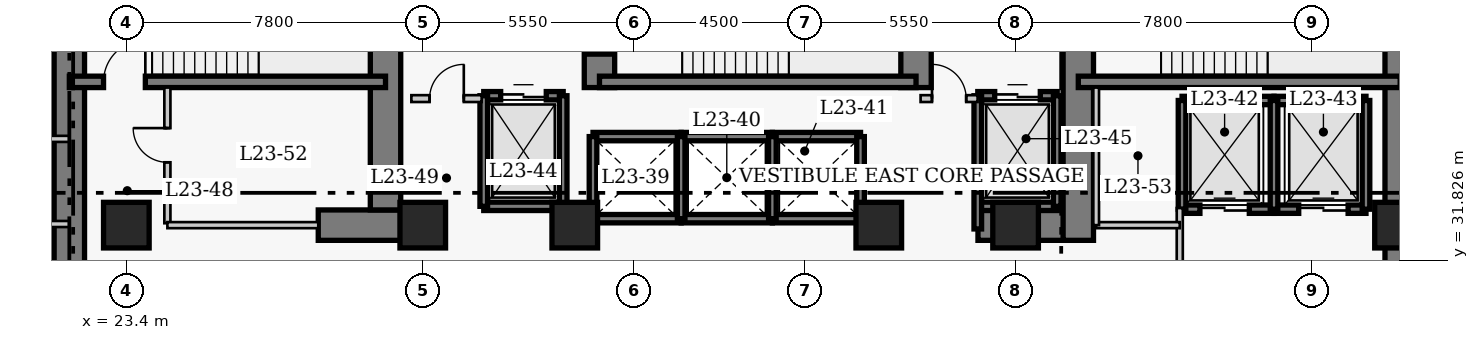
"""IFC4 building model, lengths in metres.
Left out: names, types, materials, properties, quantities, classifications, styles, units other than length and angle.
Written with IfcOpenShell. Run it as: python <this file> out.ifc"""

import sys

from ifc_helpers import new_model, si_unit, direction, frame, frame_2d, origin, origin_2d, place, context, subcontext, project, spatial, rectangle, extrude, element, fill, save


model = new_model("IFC4")
c1 = context("Model", 3, precision=1e-05, world=origin(), true_north=direction((0.0, 1.0)))
c2 = subcontext(c1, "Body", "Model", "MODEL_VIEW")
j1 = project(units=[si_unit("LENGTHUNIT", "METRE"), si_unit("PLANEANGLEUNIT", "RADIAN")], contexts=[c1])
p1 = place(None, origin())
s1 = spatial("IfcSite", under=j1, at=p1, CompositionType="ELEMENT")
p2 = place(p1, origin())
s2 = spatial("IfcBuilding", under=s1, at=p2, CompositionType="ELEMENT")
p3 = place(p2, frame((0.0, 0.0, 95.6)))
s3 = spatial("IfcBuildingStorey", under=s2, at=p3, CompositionType="ELEMENT", Elevation=95.6)
for number, where, z_axis, x_axis in (
    (1, (21.9, 27.05, 0.0), (0.0, 0.0, 1.0), (0.0, 1.0, 0.0)),
    (2, (56.92, 27.05, 0.0), (0.0, 0.0, 1.0), (0.0, 1.0, 0.0)),
):
    element("IfcWall", number, at=place(p3, frame(where, z_axis=z_axis, x_axis=x_axis)), inside=s3, PredefinedType="SHEAR", context=c2, shape_type="SweptSolid", body=[
        extrude(rectangle(XDim=13.67, YDim=0.8, at=frame_2d((6.835, 0.0))), origin(), (0.0, 0.0, 1.0), 3.8),
    ])
p4 = place(p3, frame((28.45, 32.75, 0.0), z_axis=(0.0, 0.0, 1.0), x_axis=(1.0, 0.0, 0.0)))
e3 = element("IfcWall", 3, at=p4, inside=s3, PredefinedType="SHEAR", context=c2, shape_type="SweptSolid", body=[
    extrude(rectangle(XDim=2.4, YDim=0.8, at=frame_2d((1.2, 0.0))), origin(), (0.0, 0.0, 1.0), 3.8),
])
p5 = place(p3, frame((45.81, 32.75, 0.0), z_axis=(0.0, 0.0, 1.0), x_axis=(1.0, 0.0, 0.0)))
e4 = element("IfcWall", 4, at=p5, inside=s3, PredefinedType="SHEAR", context=c2, shape_type="SweptSolid", body=[
    extrude(rectangle(XDim=2.64, YDim=0.8, at=frame_2d((1.32, 0.0))), origin(), (0.0, 0.0, 1.0), 3.8),
])
p6 = place(p3, frame((30.22, 33.15, 0.0), z_axis=(0.0, 0.0, 1.0), x_axis=(0.0, 1.0, 0.0)))
e5 = element("IfcWall", 5, at=p6, inside=s3, PredefinedType="SHEAR", context=c2, shape_type="SweptSolid", body=[
    extrude(rectangle(XDim=7.17, YDim=0.8, at=frame_2d((3.585, 0.0))), origin(), (0.0, 0.0, 1.0), 3.8),
])
p7 = place(p3, frame((35.85, 36.37, 0.0), z_axis=(0.0, 0.0, 1.0), x_axis=(0.0, 1.0, 0.0)))
e6 = element("IfcWall", 6, at=p7, inside=s3, PredefinedType="SHEAR", context=c2, shape_type="SweptSolid", body=[
    extrude(rectangle(XDim=3.95, YDim=0.8, at=frame_2d((1.975, 0.0))), origin(), (0.0, 0.0, 1.0), 3.8),
])
p8 = place(p7, frame((0.88, 0.0, 0.0)))
e7 = element("IfcOpeningElement", 7, at=p8, cuts=e6, PredefinedType="OPENING", context=c2, shape_type="SweptSolid", body=[
    extrude(rectangle(XDim=1.1, YDim=2.15, at=frame_2d((0.55, 1.075))), frame((0.0, 0.41, 0.0), z_axis=(0.0, -1.0, 0.0), x_axis=(1.0, 0.0, 0.0)), (0.0, 0.0, 1.0), 0.82),
])
p9 = place(p3, frame((44.18, 36.37, 0.0), z_axis=(0.0, 0.0, 1.0), x_axis=(0.0, 1.0, 0.0)))
e8 = element("IfcWall", 8, at=p9, inside=s3, PredefinedType="SHEAR", context=c2, shape_type="SweptSolid", body=[
    extrude(rectangle(XDim=3.95, YDim=0.8, at=frame_2d((1.975, 0.0))), origin(), (0.0, 0.0, 1.0), 3.8),
])
p10 = place(p3, frame((48.45, 32.35, 0.0), z_axis=(0.0, 0.0, 1.0), x_axis=(0.0, 1.0, 0.0)))
e9 = element("IfcWall", 9, at=p10, inside=s3, PredefinedType="SHEAR", context=c2, shape_type="SweptSolid", body=[
    extrude(rectangle(XDim=7.97, YDim=0.8, at=frame_2d((3.985, 0.0))), origin(), (0.0, 0.0, 1.0), 3.8),
])
p11 = place(p10, frame((5.85, 0.0, 0.0)))
e10 = element("IfcOpeningElement", 10, at=p11, cuts=e9, PredefinedType="OPENING", context=c2, shape_type="SweptSolid", body=[
    extrude(rectangle(XDim=1.1, YDim=2.15, at=frame_2d((0.55, 1.075))), frame((0.0, 0.41, 0.0), z_axis=(0.0, -1.0, 0.0), x_axis=(1.0, 0.0, 0.0)), (0.0, 0.0, 1.0), 0.82),
])
p12 = place(p3, frame((21.9, 36.52, 0.0), z_axis=(0.0, 0.0, 1.0), x_axis=(1.0, 0.0, 0.0)))
e11 = element("IfcWall", 11, at=p12, inside=s3, PredefinedType="SHEAR", context=c2, shape_type="SweptSolid", body=[
    extrude(rectangle(XDim=8.32, YDim=0.3, at=frame_2d((4.16, 0.0))), origin(), (0.0, 0.0, 1.0), 3.8),
])
p13 = place(p12, frame((0.9, 0.0, 0.0)))
e12 = element("IfcOpeningElement", 12, at=p13, cuts=e11, PredefinedType="OPENING", context=c2, shape_type="SweptSolid", body=[
    extrude(rectangle(XDim=1.1, YDim=2.15, at=frame_2d((0.55, 1.075))), frame((0.0, 0.16, 0.0), z_axis=(0.0, -1.0, 0.0), x_axis=(1.0, 0.0, 0.0)), (0.0, 0.0, 1.0), 0.32),
])
p14 = place(p3, frame((35.85, 36.52, 0.0), z_axis=(0.0, 0.0, 1.0), x_axis=(1.0, 0.0, 0.0)))
e13 = element("IfcWall", 13, at=p14, inside=s3, PredefinedType="SHEAR", context=c2, shape_type="SweptSolid", body=[
    extrude(rectangle(XDim=8.33, YDim=0.3, at=frame_2d((4.165, 0.0))), origin(), (0.0, 0.0, 1.0), 3.8),
])
p15 = place(p3, frame((48.45, 36.52, 0.0), z_axis=(0.0, 0.0, 1.0), x_axis=(1.0, 0.0, 0.0)))
e14 = element("IfcWall", 14, at=p15, inside=s3, PredefinedType="SHEAR", context=c2, shape_type="SweptSolid", body=[
    extrude(rectangle(XDim=8.47, YDim=0.3, at=frame_2d((4.235, 0.0))), origin(), (0.0, 0.0, 1.0), 3.8),
])
for number, where, z_axis, x_axis in (
    (15, (23.4, 32.75, 0.0), (0.0, 0.0, 1.0), (1.0, 0.0, 0.0)),
    (16, (31.2, 32.75, 0.0), (0.0, 0.0, 1.0), (1.0, 0.0, 0.0)),
    (17, (35.2, 32.75, 0.0), (0.0, 0.0, 1.0), (1.0, 0.0, 0.0)),
    (18, (43.2, 32.75, 0.0), (0.0, 0.0, 1.0), (1.0, 0.0, 0.0)),
    (19, (46.8, 32.75, 0.0), (0.0, 0.0, 1.0), (1.0, 0.0, 0.0)),
    (20, (56.85, 32.75, 0.0), (0.0, 0.0, 1.0), (1.0, 0.0, 0.0)),
):
    element("IfcColumn", number, at=place(p3, frame(where, z_axis=z_axis, x_axis=x_axis)), inside=s3, PredefinedType="COLUMN", context=c2, shape_type="SweptSolid", body=[
        extrude(rectangle(XDim=1.2, YDim=1.2, at=origin_2d()), origin(), (0.0, 0.0, 1.0), 3.8),
    ])
for number, where, z_axis, x_axis in (
    (21, (35.68, 35.08, 0.0), (0.0, 0.0, 1.0), (1.0, 0.0, 0.0)),
    (22, (35.68, 32.92, 0.0), (0.0, 0.0, 1.0), (1.0, 0.0, 0.0)),
):
    element("IfcWall", number, at=place(p3, frame(where, z_axis=z_axis, x_axis=x_axis)), inside=s3, PredefinedType="SHEAR", context=c2, shape_type="SweptSolid", body=[
        extrude(rectangle(XDim=2.32, YDim=0.22, at=frame_2d((1.16, 0.0))), origin(), (0.0, 0.0, 1.0), 3.8),
    ])
p16 = place(p3, frame((35.68, 32.92, 0.0), z_axis=(0.0, 0.0, 1.0), x_axis=(0.0, 1.0, 0.0)))
e23 = element("IfcWall", 23, at=p16, inside=s3, PredefinedType="SHEAR", context=c2, shape_type="SweptSolid", body=[
    extrude(rectangle(XDim=2.16, YDim=0.2, at=frame_2d((1.08, 0.0))), origin(), (0.0, 0.0, 1.0), 3.8),
])
for number, where, z_axis, x_axis in (
    (24, (38.0, 35.08, 0.0), (0.0, 0.0, 1.0), (1.0, 0.0, 0.0)),
    (25, (38.0, 32.92, 0.0), (0.0, 0.0, 1.0), (1.0, 0.0, 0.0)),
):
    element("IfcWall", number, at=place(p3, frame(where, z_axis=z_axis, x_axis=x_axis)), inside=s3, PredefinedType="SHEAR", context=c2, shape_type="SweptSolid", body=[
        extrude(rectangle(XDim=2.4, YDim=0.22, at=frame_2d((1.2, 0.0))), origin(), (0.0, 0.0, 1.0), 3.8),
    ])
p17 = place(p3, frame((38.0, 32.92, 0.0), z_axis=(0.0, 0.0, 1.0), x_axis=(0.0, 1.0, 0.0)))
e26 = element("IfcWall", 26, at=p17, inside=s3, PredefinedType="SHEAR", context=c2, shape_type="SweptSolid", body=[
    extrude(rectangle(XDim=2.16, YDim=0.2, at=frame_2d((1.08, 0.0))), origin(), (0.0, 0.0, 1.0), 3.8),
])
for number, where, z_axis, x_axis in (
    (27, (40.4, 35.08, 0.0), (0.0, 0.0, 1.0), (1.0, 0.0, 0.0)),
    (28, (40.4, 32.92, 0.0), (0.0, 0.0, 1.0), (1.0, 0.0, 0.0)),
):
    element("IfcWall", number, at=place(p3, frame(where, z_axis=z_axis, x_axis=x_axis)), inside=s3, PredefinedType="SHEAR", context=c2, shape_type="SweptSolid", body=[
        extrude(rectangle(XDim=2.32, YDim=0.22, at=frame_2d((1.16, 0.0))), origin(), (0.0, 0.0, 1.0), 3.8),
    ])
for number, where, z_axis, x_axis in (
    (29, (40.4, 32.92, 0.0), (0.0, 0.0, 1.0), (0.0, 1.0, 0.0)),
    (30, (42.72, 32.92, 0.0), (0.0, 0.0, 1.0), (0.0, 1.0, 0.0)),
):
    element("IfcWall", number, at=place(p3, frame(where, z_axis=z_axis, x_axis=x_axis)), inside=s3, PredefinedType="SHEAR", context=c2, shape_type="SweptSolid", body=[
        extrude(rectangle(XDim=2.16, YDim=0.2, at=frame_2d((1.08, 0.0))), origin(), (0.0, 0.0, 1.0), 3.8),
    ])
p18 = place(p3, frame((51.18, 36.03, 0.0), z_axis=(0.0, 0.0, 1.0), x_axis=(1.0, 0.0, 0.0)))
e31 = element("IfcWall", 31, at=p18, inside=s3, PredefinedType="SHEAR", context=c2, shape_type="SweptSolid", body=[
    extrude(rectangle(XDim=2.42, YDim=0.22, at=frame_2d((1.21, 0.0))), origin(), (0.0, 0.0, 1.0), 3.8),
])
p19 = place(p3, frame((51.18, 33.17, 0.0), z_axis=(0.0, 0.0, 1.0), x_axis=(1.0, 0.0, 0.0)))
e32 = element("IfcWall", 32, at=p19, inside=s3, PredefinedType="SHEAR", context=c2, shape_type="SweptSolid", body=[
    extrude(rectangle(XDim=2.42, YDim=0.22, at=frame_2d((1.21, 0.0))), origin(), (0.0, 0.0, 1.0), 3.8),
])
p20 = place(p19, frame((0.47, 0.0, 0.0)))
e33 = element("IfcOpeningElement", 33, at=p20, cuts=e32, PredefinedType="OPENING", context=c2, shape_type="SweptSolid", body=[
    extrude(rectangle(XDim=1.3, YDim=2.15, at=frame_2d((0.65, 1.075))), frame((0.0, 0.12, 0.0), z_axis=(0.0, -1.0, 0.0), x_axis=(1.0, 0.0, 0.0)), (0.0, 0.0, 1.0), 0.24),
])
p21 = place(p3, frame((51.18, 33.17, 0.0), z_axis=(0.0, 0.0, 1.0), x_axis=(0.0, 1.0, 0.0)))
e34 = element("IfcWall", 34, at=p21, inside=s3, PredefinedType="SHEAR", context=c2, shape_type="SweptSolid", body=[
    extrude(rectangle(XDim=2.86, YDim=0.2, at=frame_2d((1.43, 0.0))), origin(), (0.0, 0.0, 1.0), 3.8),
])
p22 = place(p3, frame((53.6, 36.03, 0.0), z_axis=(0.0, 0.0, 1.0), x_axis=(1.0, 0.0, 0.0)))
e35 = element("IfcWall", 35, at=p22, inside=s3, PredefinedType="SHEAR", context=c2, shape_type="SweptSolid", body=[
    extrude(rectangle(XDim=2.42, YDim=0.22, at=frame_2d((1.21, 0.0))), origin(), (0.0, 0.0, 1.0), 3.8),
])
p23 = place(p3, frame((53.6, 33.17, 0.0), z_axis=(0.0, 0.0, 1.0), x_axis=(1.0, 0.0, 0.0)))
e36 = element("IfcWall", 36, at=p23, inside=s3, PredefinedType="SHEAR", context=c2, shape_type="SweptSolid", body=[
    extrude(rectangle(XDim=2.42, YDim=0.22, at=frame_2d((1.21, 0.0))), origin(), (0.0, 0.0, 1.0), 3.8),
])
p24 = place(p23, frame((0.65, 0.0, 0.0)))
e37 = element("IfcOpeningElement", 37, at=p24, cuts=e36, PredefinedType="OPENING", context=c2, shape_type="SweptSolid", body=[
    extrude(rectangle(XDim=1.3, YDim=2.15, at=frame_2d((0.65, 1.075))), frame((0.0, 0.12, 0.0), z_axis=(0.0, -1.0, 0.0), x_axis=(1.0, 0.0, 0.0)), (0.0, 0.0, 1.0), 0.24),
])
for number, where, z_axis, x_axis in (
    (38, (53.6, 33.17, 0.0), (0.0, 0.0, 1.0), (0.0, 1.0, 0.0)),
    (39, (56.02, 33.17, 0.0), (0.0, 0.0, 1.0), (0.0, 1.0, 0.0)),
):
    element("IfcWall", number, at=place(p3, frame(where, z_axis=z_axis, x_axis=x_axis)), inside=s3, PredefinedType="SHEAR", context=c2, shape_type="SweptSolid", body=[
        extrude(rectangle(XDim=2.86, YDim=0.2, at=frame_2d((1.43, 0.0))), origin(), (0.0, 0.0, 1.0), 3.8),
    ])
p25 = place(p3, frame((32.805, 36.155, 0.0), z_axis=(0.0, 0.0, 1.0), x_axis=(1.0, 0.0, 0.0)))
e40 = element("IfcWall", 40, at=p25, inside=s3, PredefinedType="SHEAR", context=c2, shape_type="SweptSolid", body=[
    extrude(rectangle(XDim=2.09, YDim=0.22, at=frame_2d((1.045, 0.0))), origin(), (0.0, 0.0, 1.0), 3.8),
])
p26 = place(p25, frame((0.445, 0.0, 0.0)))
e41 = element("IfcOpeningElement", 41, at=p26, cuts=e40, PredefinedType="OPENING", context=c2, shape_type="SweptSolid", body=[
    extrude(rectangle(XDim=1.2, YDim=2.15, at=frame_2d((0.6, 1.075))), frame((0.0, 0.12, 0.0), z_axis=(0.0, -1.0, 0.0), x_axis=(1.0, 0.0, 0.0)), (0.0, 0.0, 1.0), 0.24),
])
p27 = place(p3, frame((32.805, 33.245, 0.0), z_axis=(0.0, 0.0, 1.0), x_axis=(1.0, 0.0, 0.0)))
e42 = element("IfcWall", 42, at=p27, inside=s3, PredefinedType="SHEAR", context=c2, shape_type="SweptSolid", body=[
    extrude(rectangle(XDim=2.09, YDim=0.22, at=frame_2d((1.045, 0.0))), origin(), (0.0, 0.0, 1.0), 3.8),
])
for number, where, z_axis, x_axis in (
    (43, (32.805, 33.245, 0.0), (0.0, 0.0, 1.0), (0.0, 1.0, 0.0)),
    (44, (34.895, 33.245, 0.0), (0.0, 0.0, 1.0), (0.0, 1.0, 0.0)),
):
    element("IfcWall", number, at=place(p3, frame(where, z_axis=z_axis, x_axis=x_axis)), inside=s3, PredefinedType="SHEAR", context=c2, shape_type="SweptSolid", body=[
        extrude(rectangle(XDim=2.91, YDim=0.2, at=frame_2d((1.455, 0.0))), origin(), (0.0, 0.0, 1.0), 3.8),
    ])
p28 = place(p3, frame((45.805, 36.155, 0.0), z_axis=(0.0, 0.0, 1.0), x_axis=(1.0, 0.0, 0.0)))
e45 = element("IfcWall", 45, at=p28, inside=s3, PredefinedType="SHEAR", context=c2, shape_type="SweptSolid", body=[
    extrude(rectangle(XDim=2.09, YDim=0.22, at=frame_2d((1.045, 0.0))), origin(), (0.0, 0.0, 1.0), 3.8),
])
p29 = place(p28, frame((0.445, 0.0, 0.0)))
e46 = element("IfcOpeningElement", 46, at=p29, cuts=e45, PredefinedType="OPENING", context=c2, shape_type="SweptSolid", body=[
    extrude(rectangle(XDim=1.2, YDim=2.15, at=frame_2d((0.6, 1.075))), frame((0.0, 0.12, 0.0), z_axis=(0.0, -1.0, 0.0), x_axis=(1.0, 0.0, 0.0)), (0.0, 0.0, 1.0), 0.24),
])
p30 = place(p3, frame((45.805, 33.245, 0.0), z_axis=(0.0, 0.0, 1.0), x_axis=(1.0, 0.0, 0.0)))
e47 = element("IfcWall", 47, at=p30, inside=s3, PredefinedType="SHEAR", context=c2, shape_type="SweptSolid", body=[
    extrude(rectangle(XDim=2.09, YDim=0.22, at=frame_2d((1.045, 0.0))), origin(), (0.0, 0.0, 1.0), 3.8),
])
p31 = place(p3, frame((45.805, 32.65, 0.0), z_axis=(0.0, 0.0, 1.0), x_axis=(0.0, 1.0, 0.0)))
e48 = element("IfcWall", 48, at=p31, inside=s3, PredefinedType="SHEAR", context=c2, shape_type="SweptSolid", body=[
    extrude(rectangle(XDim=3.505, YDim=0.2, at=frame_2d((1.752, 0.0))), origin(), (0.0, 0.0, 1.0), 3.8),
])
p32 = place(p3, frame((47.895, 33.245, 0.0), z_axis=(0.0, 0.0, 1.0), x_axis=(0.0, 1.0, 0.0)))
e49 = element("IfcWall", 49, at=p32, inside=s3, PredefinedType="SHEAR", context=c2, shape_type="SweptSolid", body=[
    extrude(rectangle(XDim=2.91, YDim=0.2, at=frame_2d((1.455, 0.0))), origin(), (0.0, 0.0, 1.0), 3.8),
])
p33 = place(p3, frame((30.9, 36.08, 0.0), z_axis=(0.0, 0.0, 1.0), x_axis=(1.0, 0.0, 0.0)))
e50 = element("IfcWall", 50, at=p33, inside=s3, PredefinedType="PARTITIONING", context=c2, shape_type="SweptSolid", body=[
    extrude(rectangle(XDim=1.85, YDim=0.18, at=frame_2d((0.925, 0.0))), origin(), (0.0, 0.0, 1.0), 3.54),
])
p34 = place(p33, frame((0.48, 0.0, 0.0)))
e51 = element("IfcOpeningElement", 51, at=p34, cuts=e50, PredefinedType="OPENING", context=c2, shape_type="SweptSolid", body=[
    extrude(rectangle(XDim=0.9, YDim=2.15, at=frame_2d((0.45, 1.075))), frame((0.0, 0.1, 0.0), z_axis=(0.0, -1.0, 0.0), x_axis=(1.0, 0.0, 0.0)), (0.0, 0.0, 1.0), 0.2),
])
p35 = place(p3, frame((44.3, 36.08, 0.0), z_axis=(0.0, 0.0, 1.0), x_axis=(1.0, 0.0, 0.0)))
e52 = element("IfcWall", 52, at=p35, inside=s3, PredefinedType="PARTITIONING", context=c2, shape_type="SweptSolid", body=[
    extrude(rectangle(XDim=1.5, YDim=0.18, at=frame_2d((0.75, 0.0))), origin(), (0.0, 0.0, 1.0), 3.54),
])
p36 = place(p35, frame((0.3, 0.0, 0.0)))
e53 = element("IfcOpeningElement", 53, at=p36, cuts=e52, PredefinedType="OPENING", context=c2, shape_type="SweptSolid", body=[
    extrude(rectangle(XDim=0.9, YDim=2.15, at=frame_2d((0.45, 1.075))), frame((0.0, 0.1, 0.0), z_axis=(0.0, -1.0, 0.0), x_axis=(1.0, 0.0, 0.0)), (0.0, 0.0, 1.0), 0.2),
])
p37 = place(p3, frame((24.48, 32.8, 0.0), z_axis=(0.0, 0.0, 1.0), x_axis=(0.0, 1.0, 0.0)))
e54 = element("IfcWall", 54, at=p37, inside=s3, PredefinedType="PARTITIONING", context=c2, shape_type="SweptSolid", body=[
    extrude(rectangle(XDim=3.57, YDim=0.16, at=frame_2d((1.785, 0.0))), origin(), (0.0, 0.0, 1.0), 3.54),
])
p38 = place(p37, frame((1.604, 0.0, 0.0)))
e55 = element("IfcOpeningElement", 55, at=p38, cuts=e54, PredefinedType="OPENING", context=c2, shape_type="SweptSolid", body=[
    extrude(rectangle(XDim=0.9, YDim=2.1, at=frame_2d((0.45, 1.05))), frame((0.0, 0.09, 0.0), z_axis=(0.0, -1.0, 0.0), x_axis=(1.0, 0.0, 0.0)), (0.0, 0.0, 1.0), 0.18),
])
p39 = place(p3, frame((51.12, 29.5, 0.0), z_axis=(0.0, 0.0, 1.0), x_axis=(0.0, 1.0, 0.0)))
e56 = element("IfcWall", 56, at=p39, inside=s3, PredefinedType="PARTITIONING", context=c2, shape_type="SweptSolid", body=[
    extrude(rectangle(XDim=3.7, YDim=0.16, at=frame_2d((1.85, 0.0))), origin(), (0.0, 0.0, 1.0), 3.54),
])
p40 = place(p39, frame((0.9, 0.0, 0.0)))
e57 = element("IfcOpeningElement", 57, at=p40, cuts=e56, PredefinedType="OPENING", context=c2, shape_type="SweptSolid", body=[
    extrude(rectangle(XDim=1.1, YDim=2.15, at=frame_2d((0.55, 1.075))), frame((0.0, 0.09, 0.0), z_axis=(0.0, -1.0, 0.0), x_axis=(1.0, 0.0, 0.0)), (0.0, 0.0, 1.0), 0.18),
])
p41 = place(p3, frame((24.48, 32.75, 0.0), z_axis=(0.0, 0.0, 1.0), x_axis=(1.0, 0.0, 0.0)))
e58 = element("IfcWall", 58, at=p41, inside=s3, PredefinedType="PARTITIONING", context=c2, shape_type="SweptSolid", body=[
    extrude(rectangle(XDim=3.97, YDim=0.16, at=frame_2d((1.985, 0.0))), origin(), (0.0, 0.0, 1.0), 3.54),
])
p42 = place(p3, frame((48.92, 32.75, 0.0), z_axis=(0.0, 0.0, 1.0), x_axis=(1.0, 0.0, 0.0)))
e59 = element("IfcWall", 59, at=p42, inside=s3, PredefinedType="PARTITIONING", context=c2, shape_type="SweptSolid", body=[
    extrude(rectangle(XDim=2.2, YDim=0.16, at=frame_2d((1.1, 0.0))), origin(), (0.0, 0.0, 1.0), 3.54),
])
p43 = place(p3, frame((48.92, 32.75, 0.0), z_axis=(0.0, 0.0, 1.0), x_axis=(0.0, 1.0, 0.0)))
e60 = element("IfcWall", 60, at=p43, inside=s3, PredefinedType="PARTITIONING", context=c2, shape_type="SweptSolid", body=[
    extrude(rectangle(XDim=3.62, YDim=0.15, at=frame_2d((1.81, 0.0))), origin(), (0.0, 0.0, 1.0), 3.54),
])
for number, where, z_axis, x_axis in (
    (61, (18.86, 35.02, 0.0), (0.0, 0.0, 1.0), (1.0, 0.0, 0.0)),
    (62, (18.86, 32.78, 0.0), (0.0, 0.0, 1.0), (1.0, 0.0, 0.0)),
):
    element("IfcWall", number, at=place(p3, frame(where, z_axis=z_axis, x_axis=x_axis)), inside=s3, PredefinedType="PARTITIONING", context=c2, shape_type="SweptSolid", body=[
        extrude(rectangle(XDim=3.04, YDim=0.16, at=frame_2d((1.52, 0.0))), origin(), (0.0, 0.0, 1.0), 3.54),
    ])
p44 = place(p20, origin())
e63 = element("IfcDoor", 63, at=p44, inside=s3, OperationType="DOUBLE_DOOR_SLIDING", PredefinedType="DOOR", context=c2, shape_type="SweptSolid", body=[
    extrude(rectangle(XDim=1.3, YDim=2.15, at=frame_2d((0.65, 1.075))), frame((0.0, 0.025, 0.0), z_axis=(0.0, -1.0, 0.0), x_axis=(1.0, 0.0, 0.0)), (0.0, 0.0, 1.0), 0.05),
])
fill(e33, e63)
p45 = place(p24, origin())
e64 = element("IfcDoor", 64, at=p45, inside=s3, OperationType="DOUBLE_DOOR_SLIDING", PredefinedType="DOOR", context=c2, shape_type="SweptSolid", body=[
    extrude(rectangle(XDim=1.3, YDim=2.15, at=frame_2d((0.65, 1.075))), frame((0.0, 0.025, 0.0), z_axis=(0.0, -1.0, 0.0), x_axis=(1.0, 0.0, 0.0)), (0.0, 0.0, 1.0), 0.05),
])
fill(e37, e64)
p46 = place(p26, origin())
e65 = element("IfcDoor", 65, at=p46, inside=s3, OperationType="DOUBLE_DOOR_SLIDING", PredefinedType="DOOR", context=c2, shape_type="SweptSolid", body=[
    extrude(rectangle(XDim=1.2, YDim=2.15, at=frame_2d((0.6, 1.075))), frame((0.0, 0.025, 0.0), z_axis=(0.0, -1.0, 0.0), x_axis=(1.0, 0.0, 0.0)), (0.0, 0.0, 1.0), 0.05),
])
fill(e41, e65)
p47 = place(p29, origin())
e66 = element("IfcDoor", 66, at=p47, inside=s3, OperationType="DOUBLE_DOOR_SLIDING", PredefinedType="DOOR", context=c2, shape_type="SweptSolid", body=[
    extrude(rectangle(XDim=1.2, YDim=2.15, at=frame_2d((0.6, 1.075))), frame((0.0, 0.025, 0.0), z_axis=(0.0, -1.0, 0.0), x_axis=(1.0, 0.0, 0.0)), (0.0, 0.0, 1.0), 0.05),
])
fill(e46, e66)
p48 = place(p34, origin())
e67 = element("IfcDoor", 67, at=p48, inside=s3, OperationType="SINGLE_SWING_RIGHT", PredefinedType="DOOR", context=c2, shape_type="SweptSolid", body=[
    extrude(rectangle(XDim=0.9, YDim=2.15, at=frame_2d((0.45, 1.075))), frame((0.0, 0.025, 0.0), z_axis=(0.0, -1.0, 0.0), x_axis=(1.0, 0.0, 0.0)), (0.0, 0.0, 1.0), 0.05),
])
fill(e51, e67)
p49 = place(p36, origin())
e68 = element("IfcDoor", 68, at=p49, inside=s3, OperationType="SINGLE_SWING_LEFT", PredefinedType="DOOR", context=c2, shape_type="SweptSolid", body=[
    extrude(rectangle(XDim=0.9, YDim=2.15, at=frame_2d((0.45, 1.075))), frame((0.0, 0.025, 0.0), z_axis=(0.0, -1.0, 0.0), x_axis=(1.0, 0.0, 0.0)), (0.0, 0.0, 1.0), 0.05),
])
fill(e53, e68)
p50 = place(p38, origin())
e69 = element("IfcDoor", 69, at=p50, inside=s3, OperationType="SINGLE_SWING_RIGHT", PredefinedType="DOOR", context=c2, shape_type="SweptSolid", body=[
    extrude(rectangle(XDim=0.9, YDim=2.1, at=frame_2d((0.45, 1.05))), frame((0.0, 0.025, 0.0), z_axis=(0.0, -1.0, 0.0), x_axis=(1.0, 0.0, 0.0)), (0.0, 0.0, 1.0), 0.05),
])
fill(e55, e69)
p51 = place(p13, origin())
e70 = element("IfcDoor", 70, at=p51, inside=s3, OperationType="SINGLE_SWING_RIGHT", PredefinedType="DOOR", context=c2, shape_type="SweptSolid", body=[
    extrude(rectangle(XDim=1.1, YDim=2.15, at=frame_2d((0.55, 1.075))), frame((0.0, 0.025, 0.0), z_axis=(0.0, -1.0, 0.0), x_axis=(1.0, 0.0, 0.0)), (0.0, 0.0, 1.0), 0.05),
])
fill(e12, e70)
p52 = place(p8, origin())
e71 = element("IfcDoor", 71, at=p52, inside=s3, OperationType="SINGLE_SWING_RIGHT", PredefinedType="DOOR", context=c2, shape_type="SweptSolid", body=[
    extrude(rectangle(XDim=1.1, YDim=2.15, at=frame_2d((0.55, 1.075))), frame((0.0, 0.025, 0.0), z_axis=(0.0, -1.0, 0.0), x_axis=(1.0, 0.0, 0.0)), (0.0, 0.0, 1.0), 0.05),
])
fill(e7, e71)
save(model, sys.argv[1])
